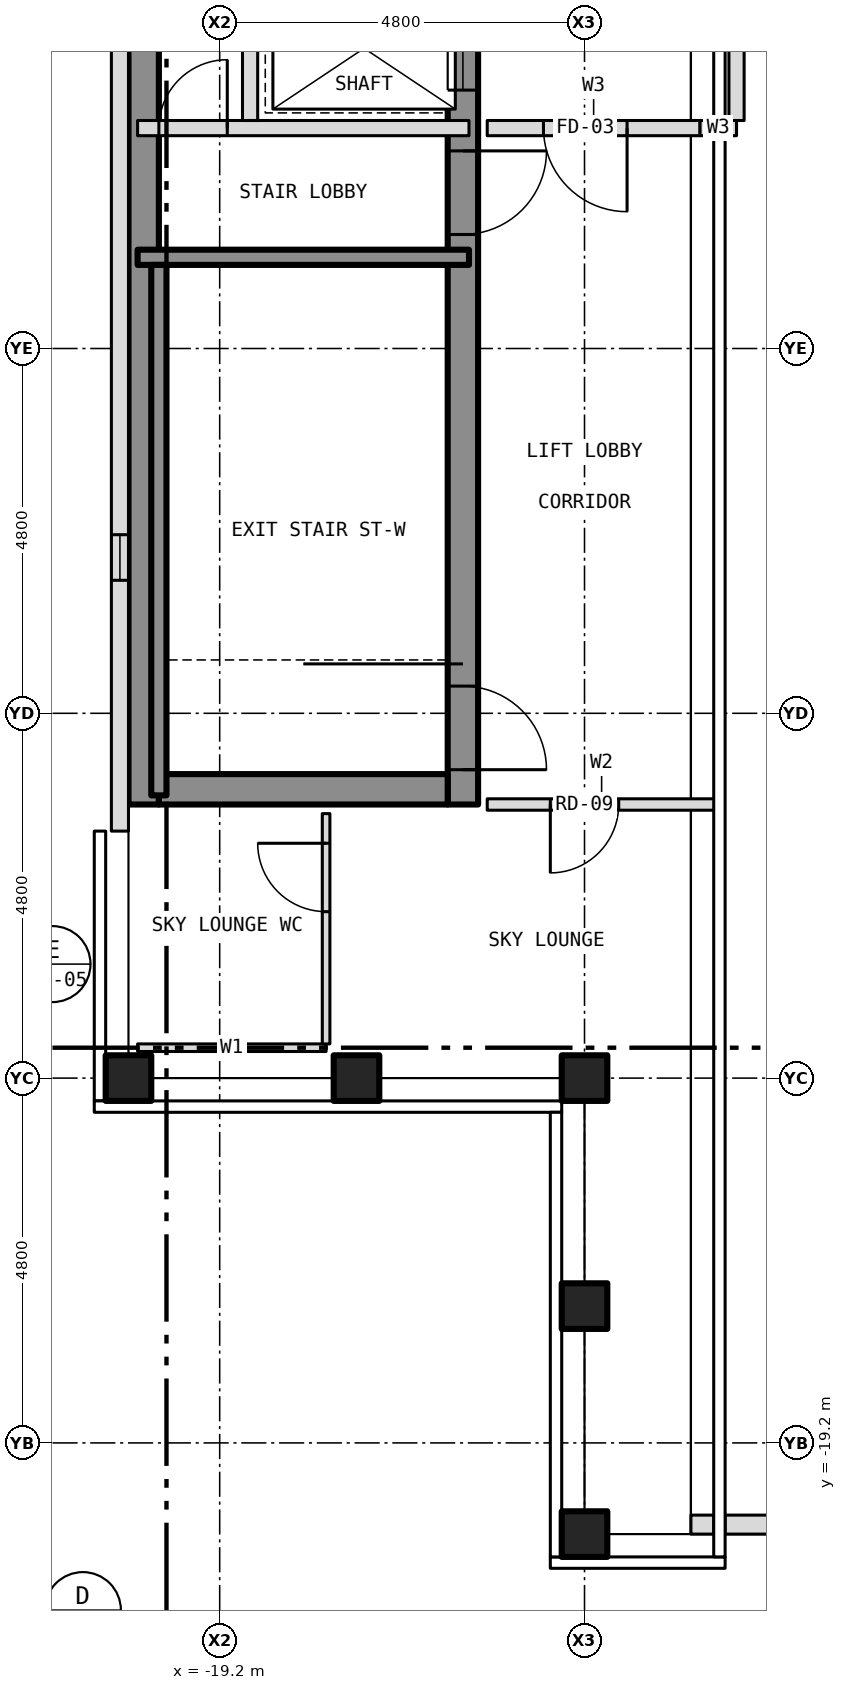
"""IFC4 building model, lengths in metres.
Left out: names, types, materials, properties, quantities, classifications, styles, units other than length and angle.
Written with IfcOpenShell. Run it as: python <this file> out.ifc"""

import sys

from ifc_helpers import new_model, si_unit, direction, frame, frame_2d, origin, origin_2d, place, context, subcontext, project, spatial, rectangle, hollow_rectangle, extrude, element, fill, save


model = new_model("IFC4")
c1 = context("Model", 3, precision=1e-05, world=origin(), true_north=direction((0.0, 1.0)))
c2 = subcontext(c1, "Body", "Model", "MODEL_VIEW")
j1 = project(units=[si_unit("LENGTHUNIT", "METRE"), si_unit("PLANEANGLEUNIT", "RADIAN")], contexts=[c1])
p1 = place(None, origin())
s1 = spatial("IfcSite", under=j1, at=p1, CompositionType="ELEMENT")
p2 = place(p1, origin())
s2 = spatial("IfcBuilding", under=s1, at=p2, CompositionType="ELEMENT")
p3 = place(p2, frame((0.0, 0.0, 286.5)))
s3 = spatial("IfcBuildingStorey", under=s2, at=p3, CompositionType="ELEMENT", Elevation=286.5)
for number, where, z_axis, x_axis in (
    (1, (-14.4, -20.4, -0.15), (0.0, 0.0, 1.0), (1.0, 0.0, 0.0)),
    (2, (-20.4, -14.4, -0.15), (0.0, 0.0, 1.0), (1.0, 0.0, 0.0)),
    (3, (-14.4, -14.4, -0.15), (0.0, 0.0, 1.0), (1.0, 0.0, 0.0)),
    (4, (-14.4, -17.4, -0.15), (0.0, 0.0, 1.0), (1.0, 0.0, 0.0)),
    (5, (-17.4, -14.4, -0.15), (0.0, 0.0, 1.0), (1.0, 0.0, 0.0)),
):
    element("IfcColumn", number, at=place(p3, frame(where, z_axis=z_axis, x_axis=x_axis)), inside=s3, PredefinedType="COLUMN", context=c2, shape_type="SweptSolid", body=[
        extrude(hollow_rectangle(XDim=0.6, YDim=0.6, WallThickness=0.03, at=origin_2d()), origin(), (0.0, 0.0, 1.0), 3.45),
    ])
p4 = place(p3, frame((-16.0, -10.8, 0.0), z_axis=(0.0, 0.0, 1.0), x_axis=(0.0, 1.0, 0.0)))
e6 = element("IfcWall", 6, at=p4, inside=s3, PredefinedType="SHEAR", context=c2, shape_type="SweptSolid", body=[
    extrude(rectangle(XDim=21.6, YDim=0.4, at=frame_2d((10.8, 0.0))), origin(), (0.0, 0.0, 1.0), 3.25),
])
p5 = place(p4, frame((9.4, 0.0, 0.0)))
e7 = element("IfcOpeningElement", 7, at=p5, cuts=e6, PredefinedType="OPENING", context=c2, shape_type="SweptSolid", body=[
    extrude(rectangle(XDim=1.1, YDim=2.1, at=frame_2d((0.55, 1.05))), frame((0.0, 0.212, 0.0), z_axis=(0.0, -1.0, 0.0), x_axis=(1.0, 0.0, 0.0)), (0.0, 0.0, 1.0), 0.424),
])
p6 = place(p4, frame((11.5, 0.0, 0.0)))
e8 = element("IfcOpeningElement", 8, at=p6, cuts=e6, PredefinedType="OPENING", context=c2, shape_type="SweptSolid", body=[
    extrude(rectangle(XDim=1.1, YDim=2.1, at=frame_2d((0.55, 1.05))), frame((0.0, 0.212, 0.0), z_axis=(0.0, -1.0, 0.0), x_axis=(1.0, 0.0, 0.0)), (0.0, 0.0, 1.0), 0.424),
])
p7 = place(p4, frame((13.6, 0.0, 0.0)))
e9 = element("IfcOpeningElement", 9, at=p7, cuts=e6, PredefinedType="OPENING", context=c2, shape_type="SweptSolid", body=[
    extrude(rectangle(XDim=1.1, YDim=2.1, at=frame_2d((0.55, 1.05))), frame((0.0, 0.212, 0.0), z_axis=(0.0, -1.0, 0.0), x_axis=(1.0, 0.0, 0.0)), (0.0, 0.0, 1.0), 0.424),
])
p8 = place(p4, frame((15.7, 0.0, 0.0)))
e10 = element("IfcOpeningElement", 10, at=p8, cuts=e6, PredefinedType="OPENING", context=c2, shape_type="SweptSolid", body=[
    extrude(rectangle(XDim=1.1, YDim=2.1, at=frame_2d((0.55, 1.05))), frame((0.0, 0.212, 0.0), z_axis=(0.0, -1.0, 0.0), x_axis=(1.0, 0.0, 0.0)), (0.0, 0.0, 1.0), 0.424),
])
p9 = place(p4, frame((17.8, 0.0, 0.0)))
e11 = element("IfcOpeningElement", 11, at=p9, cuts=e6, PredefinedType="OPENING", context=c2, shape_type="SweptSolid", body=[
    extrude(rectangle(XDim=1.1, YDim=2.1, at=frame_2d((0.55, 1.05))), frame((0.0, 0.212, 0.0), z_axis=(0.0, -1.0, 0.0), x_axis=(1.0, 0.0, 0.0)), (0.0, 0.0, 1.0), 0.424),
])
p10 = place(p4, frame((0.458, 0.0, 0.0)))
e12 = element("IfcOpeningElement", 12, at=p10, cuts=e6, PredefinedType="OPENING", context=c2, shape_type="SweptSolid", body=[
    extrude(rectangle(XDim=1.1, YDim=2.1, at=frame_2d((0.55, 1.05))), frame((0.0, 0.212, 0.0), z_axis=(0.0, -1.0, 0.0), x_axis=(1.0, 0.0, 0.0)), (0.0, 0.0, 1.0), 0.424),
])
p11 = place(p4, frame((7.5, 0.0, 0.0)))
e13 = element("IfcOpeningElement", 13, at=p11, cuts=e6, PredefinedType="OPENING", context=c2, shape_type="SweptSolid", body=[
    extrude(rectangle(XDim=1.1, YDim=2.1, at=frame_2d((0.55, 1.05))), frame((0.0, 0.212, 0.0), z_axis=(0.0, -1.0, 0.0), x_axis=(1.0, 0.0, 0.0)), (0.0, 0.0, 1.0), 0.424),
])
p12 = place(p4, frame((20.0, 0.0, 0.0)))
e14 = element("IfcOpeningElement", 14, at=p12, cuts=e6, PredefinedType="OPENING", context=c2, shape_type="SweptSolid", body=[
    extrude(rectangle(XDim=0.9, YDim=2.1, at=frame_2d((0.45, 1.05))), frame((0.0, 0.212, 0.0), z_axis=(0.0, -1.0, 0.0), x_axis=(1.0, 0.0, 0.0)), (0.0, 0.0, 1.0), 0.424),
])
p13 = place(p3, frame((-20.2, -10.8, 0.0), z_axis=(0.0, 0.0, 1.0), x_axis=(0.0, 1.0, 0.0)))
e15 = element("IfcWall", 15, at=p13, inside=s3, PredefinedType="SHEAR", context=c2, shape_type="SweptSolid", body=[
    extrude(rectangle(XDim=21.6, YDim=0.4, at=frame_2d((10.8, 0.0))), origin(), (0.0, 0.0, 1.0), 3.25),
])
p14 = place(p3, frame((-20.0, -10.6, 0.0), z_axis=(0.0, 0.0, 1.0), x_axis=(1.0, 0.0, 0.0)))
e16 = element("IfcWall", 16, at=p14, inside=s3, PredefinedType="SHEAR", context=c2, shape_type="SweptSolid", body=[
    extrude(rectangle(XDim=3.8, YDim=0.4, at=frame_2d((1.9, 0.0))), origin(), (0.0, 0.0, 1.0), 3.25),
])
p15 = place(p3, frame((-20.512, 11.15, 0.0), z_axis=(0.0, 0.0, 1.0), x_axis=(0.0, -1.0, 0.0)))
e17 = element("IfcWall", 17, at=p15, inside=s3, PredefinedType="SOLIDWALL", context=c2, shape_type="SweptSolid", body=[
    extrude(rectangle(XDim=22.3, YDim=0.225, at=frame_2d((11.15, 0.0))), origin(), (0.0, 0.0, 1.0), 3.5),
])
p16 = place(p15, frame((18.4, 0.0, 1.0)))
e18 = element("IfcOpeningElement", 18, at=p16, cuts=e17, PredefinedType="OPENING", context=c2, shape_type="SweptSolid", body=[
    extrude(rectangle(XDim=0.6, YDim=1.5, at=frame_2d((0.3, 0.75))), frame((0.0, 0.125, 0.0), z_axis=(0.0, -1.0, 0.0), x_axis=(1.0, 0.0, 0.0)), (0.0, 0.0, 1.0), 0.249),
])
p17 = place(p3, frame((-13.0, -20.275, 0.0), z_axis=(0.0, 0.0, 1.0), x_axis=(1.0, 0.0, 0.0)))
e19 = element("IfcWall", 19, at=p17, inside=s3, PredefinedType="PARAPET", context=c2, shape_type="SweptSolid", body=[
    extrude(rectangle(XDim=0.3, YDim=0.25, at=frame_2d((0.15, 0.0))), origin(), (0.0, 0.0, 1.0), 1.1),
])
p18 = place(p3, frame((-12.55, -20.275, 0.0), z_axis=(0.0, 0.0, 1.0), x_axis=(1.0, 0.0, 0.0)))
e20 = element("IfcWall", 20, at=p18, inside=s3, PredefinedType="PARAPET", context=c2, shape_type="SweptSolid", body=[
    extrude(rectangle(XDim=2.024, YDim=0.25, at=frame_2d((1.012, 0.0))), origin(), (0.0, 0.0, 1.0), 1.1),
])
p19 = place(p3, frame((-20.28, -14.0, 0.0), z_axis=(0.0, 0.0, 1.0), x_axis=(1.0, 0.0, 0.0)))
e21 = element("IfcWall", 21, at=p19, inside=s3, PredefinedType="PARTITIONING", context=c2, shape_type="SweptSolid", body=[
    extrude(rectangle(XDim=2.48, YDim=0.1, at=frame_2d((1.24, 0.0))), origin(), (0.0, 0.0, 1.0), 3.3),
])
p20 = place(p3, frame((-15.68, -10.8, 0.0), z_axis=(0.0, 0.0, 1.0), x_axis=(1.0, 0.0, 0.0)))
e22 = element("IfcWall", 22, at=p20, inside=s3, PredefinedType="PARTITIONING", context=c2, shape_type="SweptSolid", body=[
    extrude(rectangle(XDim=3.01, YDim=0.15, at=frame_2d((1.505, 0.0))), origin(), (0.0, 0.0, 1.0), 3.3),
])
p21 = place(p20, frame((0.83, 0.0, 0.0)))
e23 = element("IfcOpeningElement", 23, at=p21, cuts=e22, PredefinedType="OPENING", context=c2, shape_type="SweptSolid", body=[
    extrude(rectangle(XDim=0.9, YDim=2.1, at=frame_2d((0.45, 1.05))), frame((0.0, 0.087, 0.0), z_axis=(0.0, -1.0, 0.0), x_axis=(1.0, 0.0, 0.0)), (0.0, 0.0, 1.0), 0.174),
])
p22 = place(p3, frame((-20.28, -3.6, 0.0), z_axis=(0.0, 0.0, 1.0), x_axis=(1.0, 0.0, 0.0)))
e24 = element("IfcWall", 24, at=p22, inside=s3, PredefinedType="SHEAR", context=c2, shape_type="SweptSolid", body=[
    extrude(rectangle(XDim=4.36, YDim=0.2, at=frame_2d((2.18, 0.0))), origin(), (0.0, 0.0, 1.0), 3.25),
])
p23 = place(p3, frame((-20.28, -1.9, 0.0), z_axis=(0.0, 0.0, 1.0), x_axis=(1.0, 0.0, 0.0)))
e25 = element("IfcWall", 25, at=p23, inside=s3, PredefinedType="PARTITIONING", context=c2, shape_type="SweptSolid", body=[
    extrude(rectangle(XDim=4.36, YDim=0.2, at=frame_2d((2.18, 0.0))), origin(), (0.0, 0.0, 1.0), 3.25),
])
p24 = place(p23, frame((0.28, 0.0, 0.0)))
e26 = element("IfcOpeningElement", 26, at=p24, cuts=e25, PredefinedType="OPENING", context=c2, shape_type="SweptSolid", body=[
    extrude(rectangle(XDim=0.9, YDim=2.1, at=frame_2d((0.45, 1.05))), frame((0.0, 0.112, 0.0), z_axis=(0.0, -1.0, 0.0), x_axis=(1.0, 0.0, 0.0)), (0.0, 0.0, 1.0), 0.224),
])
p25 = place(p3, frame((-15.68, -1.9, 0.0), z_axis=(0.0, 0.0, 1.0), x_axis=(1.0, 0.0, 0.0)))
e27 = element("IfcWall", 27, at=p25, inside=s3, PredefinedType="PARTITIONING", context=c2, shape_type="SweptSolid", body=[
    extrude(rectangle(XDim=2.8, YDim=0.2, at=frame_2d((1.4, 0.0))), origin(), (0.0, 0.0, 1.0), 3.3),
])
p26 = place(p25, frame((0.74, 0.0, 0.0)))
e28 = element("IfcOpeningElement", 28, at=p26, cuts=e27, PredefinedType="OPENING", context=c2, shape_type="SweptSolid", body=[
    extrude(rectangle(XDim=1.1, YDim=2.1, at=frame_2d((0.55, 1.05))), frame((0.0, 0.112, 0.0), z_axis=(0.0, -1.0, 0.0), x_axis=(1.0, 0.0, 0.0)), (0.0, 0.0, 1.0), 0.224),
])
p27 = place(p3, frame((-12.88, -1.9, 0.0), z_axis=(0.0, 0.0, 1.0), x_axis=(1.0, 0.0, 0.0)))
e29 = element("IfcWall", 29, at=p27, inside=s3, PredefinedType="PARTITIONING", context=c2, shape_type="SweptSolid", body=[
    extrude(rectangle(XDim=0.48, YDim=0.2, at=frame_2d((0.24, 0.0))), origin(), (0.0, 0.0, 1.0), 3.3),
])
p28 = place(p3, frame((-20.0, -10.68, 0.0), z_axis=(0.0, 0.0, 1.0), x_axis=(0.0, 1.0, 0.0)))
e30 = element("IfcWall", 30, at=p28, inside=s3, PredefinedType="SHEAR", context=c2, shape_type="SweptSolid", body=[
    extrude(rectangle(XDim=6.98, YDim=0.2, at=frame_2d((3.49, 0.0))), origin(), (0.0, 0.0, 1.0), 3.25),
])
p29 = place(p3, frame((-18.8, -1.8, 0.0), z_axis=(0.0, 0.0, 1.0), x_axis=(0.0, 1.0, 0.0)))
e31 = element("IfcWall", 31, at=p29, inside=s3, PredefinedType="PARTITIONING", context=c2, shape_type="SweptSolid", body=[
    extrude(rectangle(XDim=10.3, YDim=0.2, at=frame_2d((5.15, 0.0))), origin(), (0.0, 0.0, 1.0), 3.25),
])
p30 = place(p3, frame((-17.8, -13.95, 0.0), z_axis=(0.0, 0.0, 1.0), x_axis=(0.0, 1.0, 0.0)))
e32 = element("IfcWall", 32, at=p30, inside=s3, PredefinedType="PARTITIONING", context=c2, shape_type="SweptSolid", body=[
    extrude(rectangle(XDim=3.03, YDim=0.1, at=frame_2d((1.515, 0.0))), origin(), (0.0, 0.0, 1.0), 3.3),
])
p31 = place(p30, frame((1.74, 0.0, 0.0)))
e33 = element("IfcOpeningElement", 33, at=p31, cuts=e32, PredefinedType="OPENING", context=c2, shape_type="SweptSolid", body=[
    extrude(rectangle(XDim=0.9, YDim=2.1, at=frame_2d((0.45, 1.05))), frame((0.0, 0.062, 0.0), z_axis=(0.0, -1.0, 0.0), x_axis=(1.0, 0.0, 0.0)), (0.0, 0.0, 1.0), 0.124),
])
p32 = place(p3, frame((-12.4, -1.8, 0.0), z_axis=(0.0, 0.0, 1.0), x_axis=(0.0, 1.0, 0.0)))
e34 = element("IfcWall", 34, at=p32, inside=s3, PredefinedType="PARTITIONING", context=c2, shape_type="SweptSolid", body=[
    extrude(rectangle(XDim=4.0, YDim=0.2, at=frame_2d((2.0, 0.0))), origin(), (0.0, 0.0, 1.0), 3.3),
])
p33 = place(p16, origin())
e35 = element("IfcWindow", 35, at=p33, inside=s3, PartitioningType="SINGLE_PANEL", PredefinedType="WINDOW", context=c2, shape_type="SweptSolid", body=[
    extrude(rectangle(XDim=0.6, YDim=1.5, at=frame_2d((0.3, 0.75))), frame((0.0, -0.022, 0.0), z_axis=(0.0, -1.0, 0.0), x_axis=(1.0, 0.0, 0.0)), (0.0, 0.0, 1.0), 0.06),
])
fill(e18, e35)
p34 = place(p5, origin())
e36 = element("IfcDoor", 36, at=p34, inside=s3, OperationType="SLIDING_TO_LEFT", PredefinedType="DOOR", context=c2, shape_type="SweptSolid", body=[
    extrude(rectangle(XDim=1.1, YDim=2.1, at=frame_2d((0.55, 1.05))), frame((0.0, 0.025, 0.0), z_axis=(0.0, -1.0, 0.0), x_axis=(1.0, 0.0, 0.0)), (0.0, 0.0, 1.0), 0.05),
])
fill(e7, e36)
p35 = place(p10, origin())
e37 = element("IfcDoor", 37, at=p35, inside=s3, OperationType="SINGLE_SWING_LEFT", PredefinedType="DOOR", context=c2, shape_type="SweptSolid", body=[
    extrude(rectangle(XDim=1.1, YDim=2.1, at=frame_2d((0.55, 1.05))), frame((0.0, 0.025, 0.0), z_axis=(0.0, -1.0, 0.0), x_axis=(1.0, 0.0, 0.0)), (0.0, 0.0, 1.0), 0.05),
])
fill(e12, e37)
p36 = place(p11, origin())
e38 = element("IfcDoor", 38, at=p36, inside=s3, OperationType="SINGLE_SWING_RIGHT", PredefinedType="DOOR", context=c2, shape_type="SweptSolid", body=[
    extrude(rectangle(XDim=1.1, YDim=2.1, at=frame_2d((0.55, 1.05))), frame((0.0, 0.025, 0.0), z_axis=(0.0, -1.0, 0.0), x_axis=(1.0, 0.0, 0.0)), (0.0, 0.0, 1.0), 0.05),
])
fill(e13, e38)
p37 = place(p24, origin())
e39 = element("IfcDoor", 39, at=p37, inside=s3, OperationType="SINGLE_SWING_RIGHT", PredefinedType="DOOR", context=c2, shape_type="SweptSolid", body=[
    extrude(rectangle(XDim=0.9, YDim=2.1, at=frame_2d((0.45, 1.05))), frame((0.0, 0.025, 0.0), z_axis=(0.0, -1.0, 0.0), x_axis=(1.0, 0.0, 0.0)), (0.0, 0.0, 1.0), 0.05),
])
fill(e26, e39)
p38 = place(p26, origin())
e40 = element("IfcDoor", 40, at=p38, inside=s3, OperationType="SINGLE_SWING_RIGHT", PredefinedType="DOOR", context=c2, shape_type="SweptSolid", body=[
    extrude(rectangle(XDim=1.1, YDim=2.1, at=frame_2d((0.55, 1.05))), frame((0.0, 0.025, 0.0), z_axis=(0.0, -1.0, 0.0), x_axis=(1.0, 0.0, 0.0)), (0.0, 0.0, 1.0), 0.05),
])
fill(e28, e40)
p39 = place(p21, origin())
e41 = element("IfcDoor", 41, at=p39, inside=s3, OperationType="SINGLE_SWING_LEFT", PredefinedType="DOOR", context=c2, shape_type="SweptSolid", body=[
    extrude(rectangle(XDim=0.9, YDim=2.1, at=frame_2d((0.45, 1.05))), frame((0.0, 0.025, 0.0), z_axis=(0.0, -1.0, 0.0), x_axis=(1.0, 0.0, 0.0)), (0.0, 0.0, 1.0), 0.05),
])
fill(e23, e41)
p40 = place(p31, origin())
e42 = element("IfcDoor", 42, at=p40, inside=s3, OperationType="SINGLE_SWING_RIGHT", PredefinedType="DOOR", context=c2, shape_type="SweptSolid", body=[
    extrude(rectangle(XDim=0.9, YDim=2.1, at=frame_2d((0.45, 1.05))), frame((0.0, 0.025, 0.0), z_axis=(0.0, -1.0, 0.0), x_axis=(1.0, 0.0, 0.0)), (0.0, 0.0, 1.0), 0.05),
])
fill(e33, e42)
save(model, sys.argv[1])
